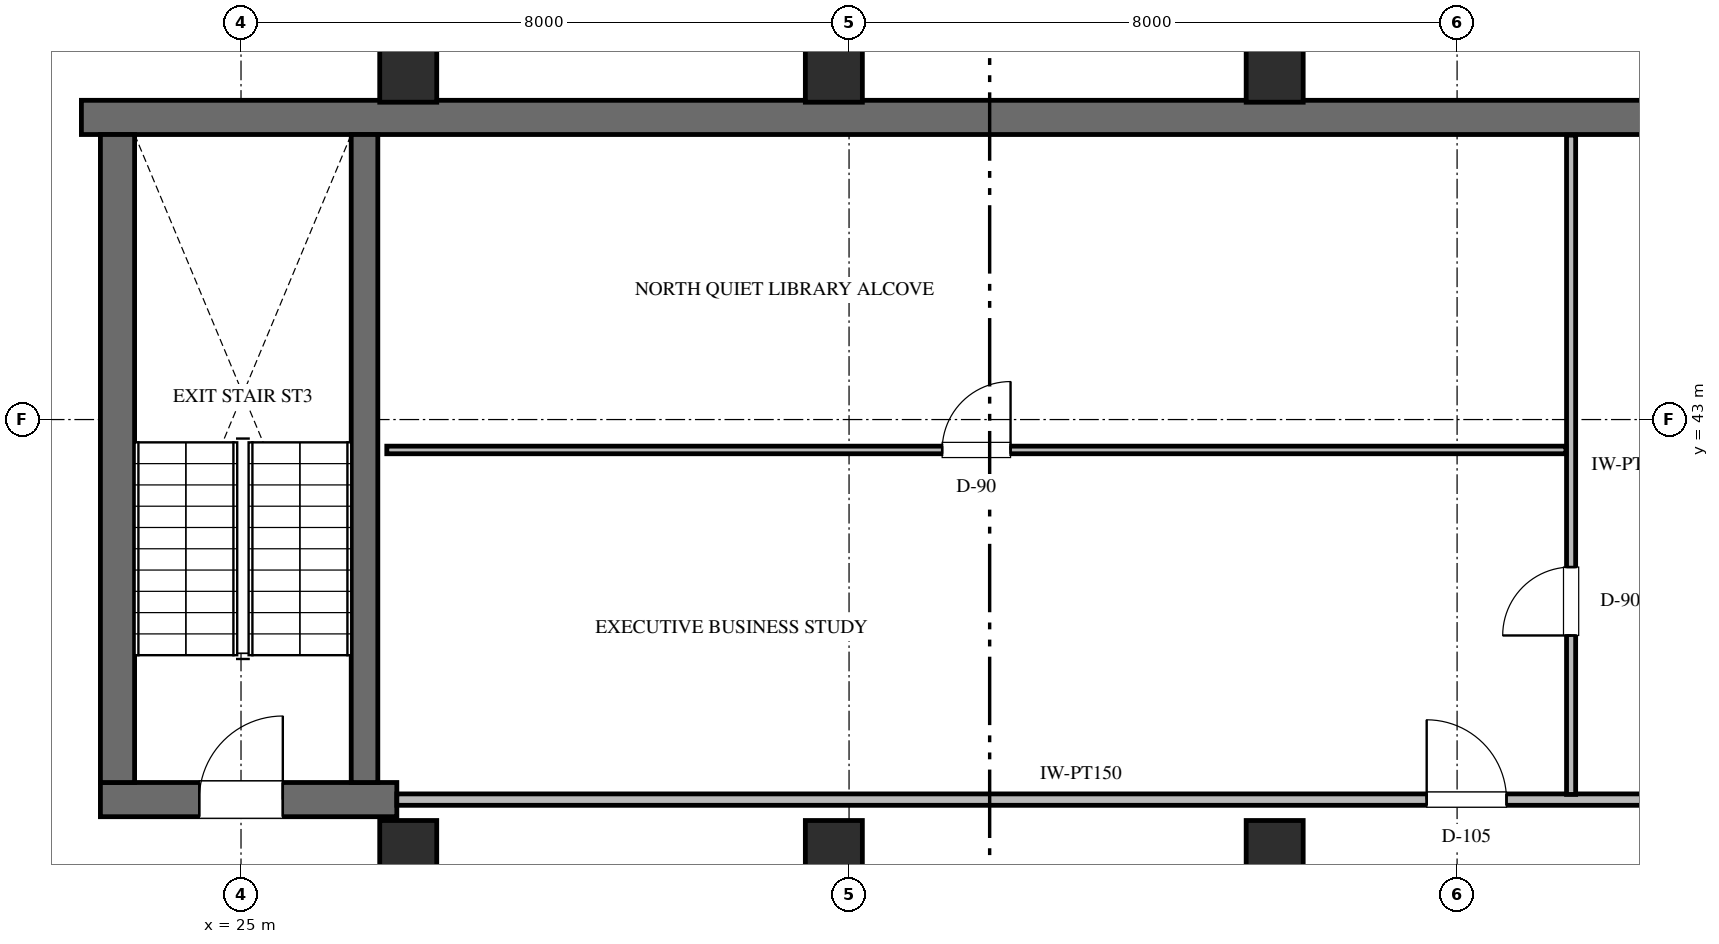
"""IFC4 building model, lengths in metres.
Left out: names, types, materials, properties, quantities, classifications, styles, units other than length and angle.
Written with IfcOpenShell. Run it as: python <this file> out.ifc"""

import sys

from ifc_helpers import new_model, si_unit, direction, frame, frame_2d, origin, origin_2d, place, context, subcontext, project, spatial, rectangle, extrude, element, fill, save


model = new_model("IFC4")
c1 = context("Model", 3, precision=1e-05, world=origin(), true_north=direction((0.0, 1.0)))
c2 = subcontext(c1, "Body", "Model", "MODEL_VIEW")
j1 = project(units=[si_unit("LENGTHUNIT", "METRE"), si_unit("PLANEANGLEUNIT", "RADIAN")], contexts=[c1])
p1 = place(None, origin())
s1 = spatial("IfcSite", under=j1, at=p1, CompositionType="ELEMENT")
p2 = place(p1, origin())
s2 = spatial("IfcBuilding", under=s1, at=p2, CompositionType="ELEMENT")
p3 = place(p2, frame((0.0, 0.0, 231.0)))
s3 = spatial("IfcBuildingStorey", under=s2, at=p3, CompositionType="ELEMENT", Elevation=231.0)
p4 = place(p3, frame((22.9, 46.975, 0.0), z_axis=(0.0, 0.0, 1.0), x_axis=(1.0, 0.0, 0.0)))
e1 = element("IfcWall", 1, at=p4, inside=s3, PredefinedType="SHEAR", context=c2, shape_type="SweptSolid", body=[
    extrude(rectangle(XDim=43.4, YDim=0.45, at=frame_2d((21.7, 0.0))), origin(), (0.0, 0.0, 1.0), 3.6),
])
p5 = place(p3, frame((23.15, 38.0, 0.0), z_axis=(0.0, 0.0, 1.0), x_axis=(1.0, 0.0, 0.0)))
e2 = element("IfcWall", 2, at=p5, inside=s3, PredefinedType="SHEAR", context=c2, shape_type="SweptSolid", body=[
    extrude(rectangle(XDim=3.9, YDim=0.45, at=frame_2d((1.95, 0.0))), origin(), (0.0, 0.0, 1.0), 3.6),
])
p6 = place(p5, frame((1.3, 0.0, 0.0)))
e3 = element("IfcOpeningElement", 3, at=p6, cuts=e2, PredefinedType="OPENING", context=c2, shape_type="SweptSolid", body=[
    extrude(rectangle(XDim=1.1, YDim=2.2, at=frame_2d((0.55, 1.1))), frame((0.0, 0.235, 0.0), z_axis=(0.0, -1.0, 0.0), x_axis=(1.0, 0.0, 0.0)), (0.0, 0.0, 1.0), 0.47),
])
p7 = place(p3, frame((23.375, 38.225, 0.0), z_axis=(0.0, 0.0, 1.0), x_axis=(0.0, 1.0, 0.0)))
e4 = element("IfcWall", 4, at=p7, inside=s3, PredefinedType="SHEAR", context=c2, shape_type="SweptSolid", body=[
    extrude(rectangle(XDim=8.525, YDim=0.45, at=frame_2d((4.262, 0.0))), origin(), (0.0, 0.0, 1.0), 3.6),
])
p8 = place(p3, frame((26.625, 38.225, 0.0), z_axis=(0.0, 0.0, 1.0), x_axis=(0.0, 1.0, 0.0)))
e5 = element("IfcWall", 5, at=p8, inside=s3, PredefinedType="SHEAR", context=c2, shape_type="SweptSolid", body=[
    extrude(rectangle(XDim=8.525, YDim=0.35, at=frame_2d((4.262, 0.0))), origin(), (0.0, 0.0, 1.0), 3.6),
])
for number, where, z_axis, x_axis in (
    (6, (38.6, 37.35, 0.0), (0.0, 0.0, 1.0), (1.0, 0.0, 0.0)),
    (7, (38.6, 47.55, 0.0), (0.0, 0.0, 1.0), (1.0, 0.0, 0.0)),
    (8, (32.8, 37.35, 0.0), (0.0, 0.0, 1.0), (1.0, 0.0, 0.0)),
    (9, (32.8, 47.55, 0.0), (0.0, 0.0, 1.0), (1.0, 0.0, 0.0)),
    (10, (27.2, 37.35, 0.0), (0.0, 0.0, 1.0), (1.0, 0.0, 0.0)),
    (11, (27.2, 47.55, 0.0), (0.0, 0.0, 1.0), (1.0, 0.0, 0.0)),
):
    element("IfcColumn", number, at=place(p3, frame(where, z_axis=z_axis, x_axis=x_axis)), inside=s3, PredefinedType="COLUMN", context=c2, shape_type="SweptSolid", body=[
        extrude(rectangle(XDim=0.75, YDim=0.75, at=origin_2d()), origin(), (0.0, 0.0, 1.0), 3.6),
    ])
p9 = place(p3, frame((23.917, 18.642, 0.0), z_axis=(0.0, 0.0, 1.0), x_axis=(-0.139177296983, 0.99026747902, 0.0)))
e12 = element("IfcWall", 12, at=p9, inside=s3, PredefinedType="STANDARD", context=c2, shape_type="SweptSolid", body=[
    extrude(rectangle(XDim=19.347, YDim=0.28, at=frame_2d((9.673, 0.0))), origin(), (0.0, 0.0, 1.0), 3.36),
])
p10 = place(p9, frame((9.063, 0.0, 0.0)))
e13 = element("IfcOpeningElement", 13, at=p10, cuts=e12, PredefinedType="OPENING", context=c2, shape_type="SweptSolid", body=[
    extrude(rectangle(XDim=1.1, YDim=2.2, at=frame_2d((0.55, 1.1))), frame((0.0, 0.15, 0.0), z_axis=(0.0, -1.0, 0.0), x_axis=(1.0, 0.0, 0.0)), (0.0, 0.0, 1.0), 0.3),
])
p11 = place(p9, frame((3.371, 0.0, 0.65)))
e14 = element("IfcOpeningElement", 14, at=p11, cuts=e12, PredefinedType="OPENING", context=c2, shape_type="SweptSolid", body=[
    extrude(rectangle(XDim=1.8, YDim=2.1, at=frame_2d((0.9, 1.05))), frame((0.0, 0.15, 0.0), z_axis=(0.0, -1.0, 0.0), x_axis=(1.0, 0.0, 0.0)), (0.0, 0.0, 1.0), 0.3),
])
p12 = place(p3, frame((27.05, 38.0, 0.0), z_axis=(0.0, 0.0, 1.0), x_axis=(1.0, 0.0, 0.0)))
e15 = element("IfcWall", 15, at=p12, inside=s3, PredefinedType="PARTITIONING", context=c2, shape_type="SweptSolid", body=[
    extrude(rectangle(XDim=18.0, YDim=0.15, at=frame_2d((9.0, 0.0))), origin(), (0.0, 0.0, 1.0), 2.664),
])
p13 = place(p12, frame((13.55, 0.0, 0.0)))
e16 = element("IfcOpeningElement", 16, at=p13, cuts=e15, PredefinedType="OPENING", context=c2, shape_type="SweptSolid", body=[
    extrude(rectangle(XDim=1.05, YDim=2.2, at=frame_2d((0.525, 1.1))), frame((0.0, 0.085, 0.0), z_axis=(0.0, -1.0, 0.0), x_axis=(1.0, 0.0, 0.0)), (0.0, 0.0, 1.0), 0.17),
])
p14 = place(p3, frame((42.5, 38.068, 0.0), z_axis=(0.0, 0.0, 1.0), x_axis=(0.0, 1.0, 0.0)))
e17 = element("IfcWall", 17, at=p14, inside=s3, PredefinedType="PARTITIONING", context=c2, shape_type="SweptSolid", body=[
    extrude(rectangle(XDim=8.674, YDim=0.12, at=frame_2d((4.337, 0.0))), origin(), (0.0, 0.0, 1.0), 3.36),
])
p15 = place(p14, frame((2.091, 0.0, 0.0)))
e18 = element("IfcOpeningElement", 18, at=p15, cuts=e17, PredefinedType="OPENING", context=c2, shape_type="SweptSolid", body=[
    extrude(rectangle(XDim=0.9, YDim=2.1, at=frame_2d((0.45, 1.05))), frame((0.0, 0.07, 0.0), z_axis=(0.0, -1.0, 0.0), x_axis=(1.0, 0.0, 0.0)), (0.0, 0.0, 1.0), 0.14),
])
p16 = place(p3, frame((26.918, 42.6, 0.0), z_axis=(0.0, 0.0, 1.0), x_axis=(1.0, 0.0, 0.0)))
e19 = element("IfcWall", 19, at=p16, inside=s3, PredefinedType="PARTITIONING", context=c2, shape_type="SweptSolid", body=[
    extrude(rectangle(XDim=15.514, YDim=0.1, at=frame_2d((7.757, 0.0))), origin(), (0.0, 0.0, 1.0), 2.664),
])
p17 = place(p16, frame((7.307, 0.0, 0.0)))
e20 = element("IfcOpeningElement", 20, at=p17, cuts=e19, PredefinedType="OPENING", context=c2, shape_type="SweptSolid", body=[
    extrude(rectangle(XDim=0.9, YDim=2.1, at=frame_2d((0.45, 1.05))), frame((0.0, 0.06, 0.0), z_axis=(0.0, -1.0, 0.0), x_axis=(1.0, 0.0, 0.0)), (0.0, 0.0, 1.0), 0.12),
])
p18 = place(p6, origin())
e21 = element("IfcDoor", 21, at=p18, inside=s3, OperationType="SINGLE_SWING_RIGHT", PredefinedType="DOOR", context=c2, shape_type="SweptSolid", body=[
    extrude(rectangle(XDim=1.1, YDim=2.2, at=frame_2d((0.55, 1.1))), frame((0.0, 0.025, 0.0), z_axis=(0.0, -1.0, 0.0), x_axis=(1.0, 0.0, 0.0)), (0.0, 0.0, 1.0), 0.05),
])
fill(e3, e21)
p19 = place(p13, origin())
e22 = element("IfcDoor", 22, at=p19, inside=s3, OperationType="SINGLE_SWING_LEFT", PredefinedType="DOOR", context=c2, shape_type="SweptSolid", body=[
    extrude(rectangle(XDim=1.05, YDim=2.2, at=frame_2d((0.525, 1.1))), frame((0.0, 0.025, 0.0), z_axis=(0.0, -1.0, 0.0), x_axis=(1.0, 0.0, 0.0)), (0.0, 0.0, 1.0), 0.05),
])
fill(e16, e22)
p20 = place(p17, origin())
e23 = element("IfcDoor", 23, at=p20, inside=s3, OperationType="SINGLE_SWING_RIGHT", PredefinedType="DOOR", context=c2, shape_type="SweptSolid", body=[
    extrude(rectangle(XDim=0.9, YDim=2.1, at=frame_2d((0.45, 1.05))), frame((0.0, 0.025, 0.0), z_axis=(0.0, -1.0, 0.0), x_axis=(1.0, 0.0, 0.0)), (0.0, 0.0, 1.0), 0.05),
])
fill(e20, e23)
p21 = place(p15, origin())
e24 = element("IfcDoor", 24, at=p21, inside=s3, OperationType="SINGLE_SWING_LEFT", PredefinedType="DOOR", context=c2, shape_type="SweptSolid", body=[
    extrude(rectangle(XDim=0.9, YDim=2.1, at=frame_2d((0.45, 1.05))), frame((0.0, 0.025, 0.0), z_axis=(0.0, -1.0, 0.0), x_axis=(1.0, 0.0, 0.0)), (0.0, 0.0, 1.0), 0.05),
])
fill(e18, e24)
save(model, sys.argv[1])
